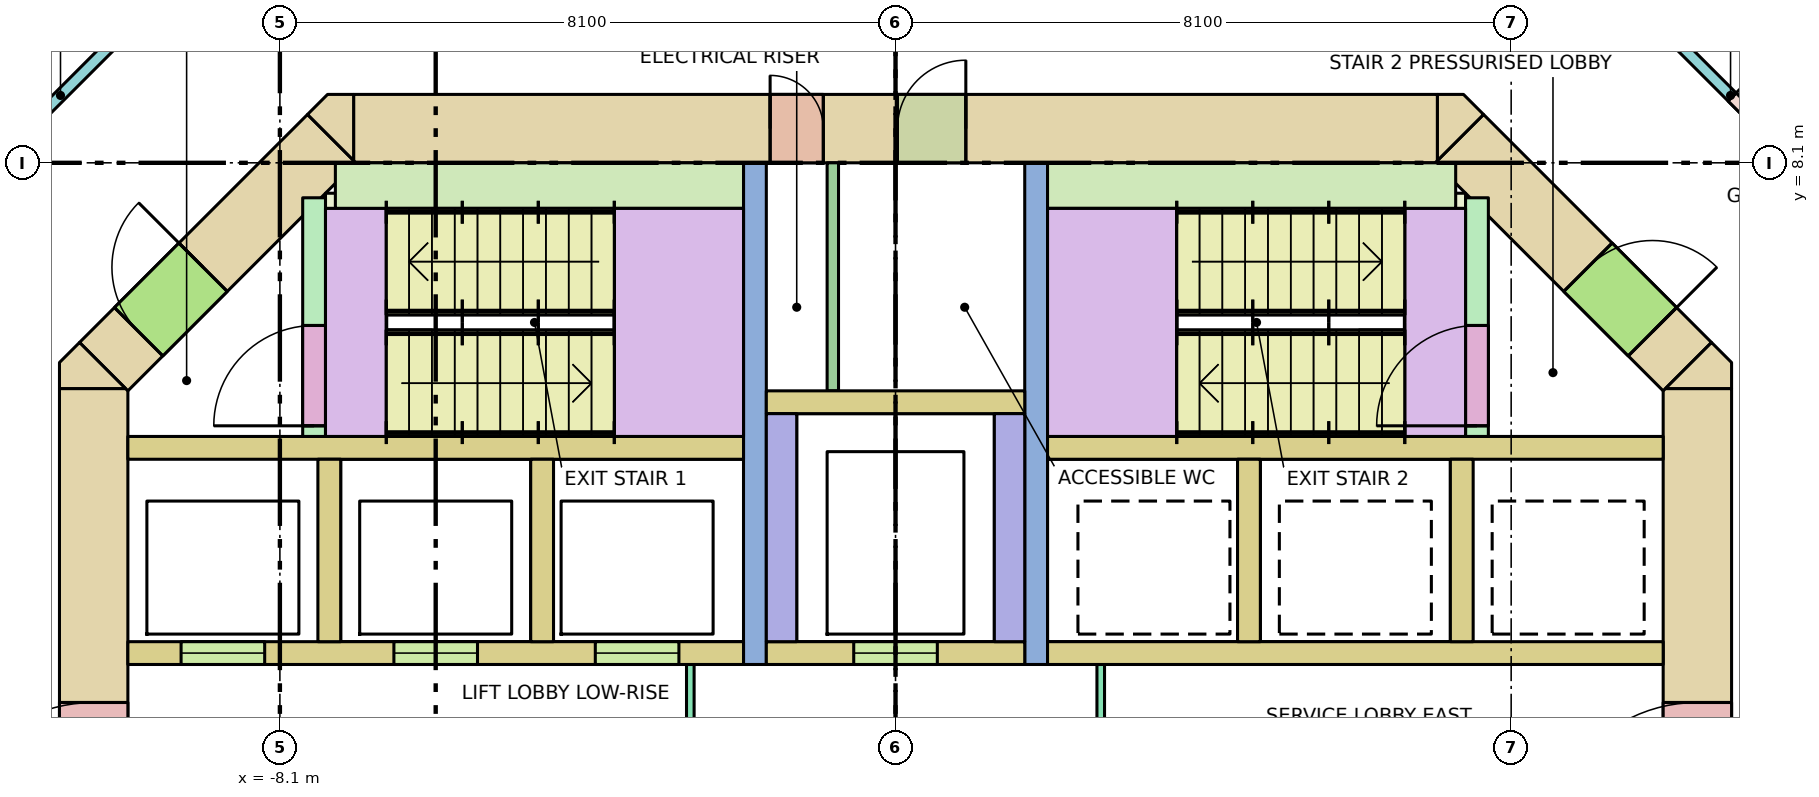
"""IFC4 building model, lengths in metres.
Left out: names, types, materials, properties, quantities, classifications, styles, units other than length and angle.
Written with IfcOpenShell. Run it as: python <this file> out.ifc"""

import sys

from ifc_helpers import new_model, si_unit, direction, frame, frame_2d, origin, place, context, subcontext, project, spatial, polyline, rectangle, outline, extrude, element, fill, save


model = new_model("IFC4")
c1 = context("Model", 3, precision=1e-05, world=origin(), true_north=direction((0.0, 1.0)))
c2 = subcontext(c1, "Body", "Model", "MODEL_VIEW")
j1 = project(units=[si_unit("LENGTHUNIT", "METRE"), si_unit("PLANEANGLEUNIT", "RADIAN")], contexts=[c1])
p1 = place(None, origin())
s1 = spatial("IfcSite", under=j1, at=p1, CompositionType="ELEMENT")
p2 = place(p1, origin())
s2 = spatial("IfcBuilding", under=s1, at=p2, CompositionType="ELEMENT")
p3 = place(p2, frame((0.0, 0.0, 79.0)))
s3 = spatial("IfcBuildingStorey", under=s2, at=p3, CompositionType="ELEMENT", Elevation=79.0)
p4 = place(p3, frame((-7.13, 8.55, -0.28), z_axis=(0.0, 0.0, 1.0), x_axis=(1.0, 0.0, 0.0)))
e1 = element("IfcWall", 1, at=p4, inside=s3, PredefinedType="SHEAR", context=c2, shape_type="SweptSolid", body=[
    extrude(rectangle(XDim=14.26, YDim=0.9, at=frame_2d((7.13, 0.0))), origin(), (0.0, 0.0, 1.0), 7.6),
])
p5 = place(p4, frame((5.48, 0.0, 0.28)))
e2 = element("IfcOpeningElement", 2, at=p5, cuts=e1, PredefinedType="OPENING", context=c2, shape_type="SweptSolid", body=[
    extrude(rectangle(XDim=0.7, YDim=2.1, at=frame_2d((0.35, 1.05))), frame((0.0, 0.46, 0.0), z_axis=(0.0, -1.0, 0.0), x_axis=(1.0, 0.0, 0.0)), (0.0, 0.0, 1.0), 0.92),
])
p6 = place(p4, frame((7.155, 0.0, 0.28)))
e3 = element("IfcOpeningElement", 3, at=p6, cuts=e1, PredefinedType="OPENING", context=c2, shape_type="SweptSolid", body=[
    extrude(rectangle(XDim=0.9, YDim=2.1, at=frame_2d((0.45, 1.05))), frame((0.0, 0.46, 0.0), z_axis=(0.0, -1.0, 0.0), x_axis=(1.0, 0.0, 0.0)), (0.0, 0.0, 1.0), 0.92),
])
p7 = place(p3, frame((-10.55, -5.13, -0.28), z_axis=(0.0, 0.0, 1.0), x_axis=(0.0, 1.0, 0.0)))
e4 = element("IfcWall", 4, at=p7, inside=s3, PredefinedType="SHEAR", context=c2, shape_type="SweptSolid", body=[
    extrude(rectangle(XDim=10.26, YDim=0.9, at=frame_2d((5.13, 0.0))), origin(), (0.0, 0.0, 1.0), 7.6),
])
p8 = place(p7, frame((4.13, 0.0, 0.28)))
e5 = element("IfcOpeningElement", 5, at=p8, cuts=e4, PredefinedType="OPENING", context=c2, shape_type="SweptSolid", body=[
    extrude(rectangle(XDim=2.0, YDim=2.1, at=frame_2d((1.0, 1.05))), frame((0.0, 0.46, 0.0), z_axis=(0.0, -1.0, 0.0), x_axis=(1.0, 0.0, 0.0)), (0.0, 0.0, 1.0), 0.92),
])
p9 = place(p3, frame((10.55, -5.13, -0.28), z_axis=(0.0, 0.0, 1.0), x_axis=(0.0, 1.0, 0.0)))
e6 = element("IfcWall", 6, at=p9, inside=s3, PredefinedType="SHEAR", context=c2, shape_type="SweptSolid", body=[
    extrude(rectangle(XDim=10.26, YDim=0.9, at=frame_2d((5.13, 0.0))), origin(), (0.0, 0.0, 1.0), 7.6),
])
p10 = place(p9, frame((4.13, 0.0, 0.28)))
e7 = element("IfcOpeningElement", 7, at=p10, cuts=e6, PredefinedType="OPENING", context=c2, shape_type="SweptSolid", body=[
    extrude(rectangle(XDim=2.0, YDim=2.1, at=frame_2d((1.0, 1.05))), frame((0.0, 0.46, 0.0), z_axis=(0.0, -1.0, 0.0), x_axis=(1.0, 0.0, 0.0)), (0.0, 0.0, 1.0), 0.92),
])
p11 = place(p3, frame((-10.418, 5.418, -0.28), z_axis=(0.0, 0.0, 1.0), x_axis=(0.707106781187, 0.707106781187, 0.0)))
e8 = element("IfcWall", 8, at=p11, inside=s3, PredefinedType="SHEAR", context=c2, shape_type="SweptSolid", body=[
    extrude(rectangle(XDim=4.243, YDim=0.9, at=frame_2d((2.121, 0.0))), origin(), (0.0, 0.0, 1.0), 7.6),
])
p12 = place(p11, frame((0.65, 0.0, 0.28)))
e9 = element("IfcOpeningElement", 9, at=p12, cuts=e8, PredefinedType="OPENING", context=c2, shape_type="SweptSolid", body=[
    extrude(rectangle(XDim=1.2, YDim=2.1, at=frame_2d((0.6, 1.05))), frame((0.0, 0.46, 0.0), z_axis=(0.0, -1.0, 0.0), x_axis=(1.0, 0.0, 0.0)), (0.0, 0.0, 1.0), 0.92),
])
p13 = place(p3, frame((7.418, 8.418, -0.28), z_axis=(0.0, 0.0, 1.0), x_axis=(0.707106781187, -0.707106781187, 0.0)))
e10 = element("IfcWall", 10, at=p13, inside=s3, PredefinedType="SHEAR", context=c2, shape_type="SweptSolid", body=[
    extrude(rectangle(XDim=4.243, YDim=0.9, at=frame_2d((2.121, 0.0))), origin(), (0.0, 0.0, 1.0), 7.6),
])
p14 = place(p13, frame((2.393, 0.0, 0.28)))
e11 = element("IfcOpeningElement", 11, at=p14, cuts=e10, PredefinedType="OPENING", context=c2, shape_type="SweptSolid", body=[
    extrude(rectangle(XDim=1.2, YDim=2.1, at=frame_2d((0.6, 1.05))), frame((0.0, 0.46, 0.0), z_axis=(0.0, -1.0, 0.0), x_axis=(1.0, 0.0, 0.0)), (0.0, 0.0, 1.0), 0.92),
])
p15 = place(p3, frame((0.0, 0.0, -0.28)))
e12 = element("IfcWall", 12, at=p15, inside=s3, PredefinedType="SHEAR", context=c2, shape_type="SweptSolid", body=[
    extrude(outline(polyline([(-10.736, 5.736), (-10.13, 5.13), (-11.0, 5.13), (-11.0, 5.473), (-10.736, 5.736)])), origin(), (0.0, 0.0, 1.0), 7.6),
])
p16 = place(p3, frame((0.0, 0.0, -0.28)))
e13 = element("IfcWall", 13, at=p16, inside=s3, PredefinedType="SHEAR", context=c2, shape_type="SweptSolid", body=[
    extrude(outline(polyline([(11.0, 5.473), (11.0, 5.13), (10.13, 5.13), (10.736, 5.736), (11.0, 5.473)])), origin(), (0.0, 0.0, 1.0), 7.6),
])
p17 = place(p3, frame((0.0, 0.0, -0.28)))
e14 = element("IfcWall", 14, at=p17, inside=s3, PredefinedType="SHEAR", context=c2, shape_type="SweptSolid", body=[
    extrude(outline(polyline([(-7.473, 9.0), (-7.13, 9.0), (-7.13, 8.13), (-7.736, 8.736), (-7.473, 9.0)])), origin(), (0.0, 0.0, 1.0), 7.6),
])
p18 = place(p3, frame((0.0, 0.0, -0.28)))
e15 = element("IfcWall", 15, at=p18, inside=s3, PredefinedType="SHEAR", context=c2, shape_type="SweptSolid", body=[
    extrude(outline(polyline([(7.473, 9.0), (7.736, 8.736), (7.13, 8.13), (7.13, 9.0), (7.473, 9.0)])), origin(), (0.0, 0.0, 1.0), 7.6),
])
for number, where, z_axis, x_axis in (
    (16, (-10.1, 4.35, 0.0), (0.0, 0.0, 1.0), (1.0, 0.0, 0.0)),
    (17, (2.0, 4.35, 0.0), (0.0, 0.0, 1.0), (1.0, 0.0, 0.0)),
):
    element("IfcWall", number, at=place(p3, frame(where, z_axis=z_axis, x_axis=x_axis)), inside=s3, PredefinedType="SOLIDWALL", context=c2, shape_type="SweptSolid", body=[
        extrude(rectangle(XDim=8.1, YDim=0.3, at=frame_2d((4.05, 0.0))), origin(), (0.0, 0.0, 1.0), 7.32),
    ])
p19 = place(p3, frame((-10.1, 1.65, 0.0), z_axis=(0.0, 0.0, 1.0), x_axis=(1.0, 0.0, 0.0)))
e18 = element("IfcWall", 18, at=p19, inside=s3, PredefinedType="SOLIDWALL", context=c2, shape_type="SweptSolid", body=[
    extrude(rectangle(XDim=8.1, YDim=0.3, at=frame_2d((4.05, 0.0))), origin(), (0.0, 0.0, 1.0), 7.32),
])
p20 = place(p19, frame((0.7, 0.0, 0.0)))
e19 = element("IfcOpeningElement", 19, at=p20, cuts=e18, PredefinedType="OPENING", context=c2, shape_type="SweptSolid", body=[
    extrude(rectangle(XDim=1.1, YDim=2.1, at=frame_2d((0.55, 1.05))), frame((0.0, 0.16, 0.0), z_axis=(0.0, -1.0, 0.0), x_axis=(1.0, 0.0, 0.0)), (0.0, 0.0, 1.0), 0.32),
])
p21 = place(p19, frame((3.5, 0.0, 0.0)))
e20 = element("IfcOpeningElement", 20, at=p21, cuts=e18, PredefinedType="OPENING", context=c2, shape_type="SweptSolid", body=[
    extrude(rectangle(XDim=1.1, YDim=2.1, at=frame_2d((0.55, 1.05))), frame((0.0, 0.16, 0.0), z_axis=(0.0, -1.0, 0.0), x_axis=(1.0, 0.0, 0.0)), (0.0, 0.0, 1.0), 0.32),
])
p22 = place(p19, frame((6.15, 0.0, 0.0)))
e21 = element("IfcOpeningElement", 21, at=p22, cuts=e18, PredefinedType="OPENING", context=c2, shape_type="SweptSolid", body=[
    extrude(rectangle(XDim=1.1, YDim=2.1, at=frame_2d((0.55, 1.05))), frame((0.0, 0.16, 0.0), z_axis=(0.0, -1.0, 0.0), x_axis=(1.0, 0.0, 0.0)), (0.0, 0.0, 1.0), 0.32),
])
p23 = place(p3, frame((2.0, 1.65, 0.0), z_axis=(0.0, 0.0, 1.0), x_axis=(1.0, 0.0, 0.0)))
e22 = element("IfcWall", 22, at=p23, inside=s3, PredefinedType="SOLIDWALL", context=c2, shape_type="SweptSolid", body=[
    extrude(rectangle(XDim=8.1, YDim=0.3, at=frame_2d((4.05, 0.0))), origin(), (0.0, 0.0, 1.0), 7.32),
])
for number, where, z_axis, x_axis in (
    (23, (-7.45, 1.8, 0.0), (0.0, 0.0, 1.0), (0.0, 1.0, 0.0)),
    (24, (-4.65, 1.8, 0.0), (0.0, 0.0, 1.0), (0.0, 1.0, 0.0)),
    (25, (4.65, 1.8, 0.0), (0.0, 0.0, 1.0), (0.0, 1.0, 0.0)),
    (26, (7.45, 1.8, 0.0), (0.0, 0.0, 1.0), (0.0, 1.0, 0.0)),
):
    element("IfcWall", number, at=place(p3, frame(where, z_axis=z_axis, x_axis=x_axis)), inside=s3, PredefinedType="SOLIDWALL", context=c2, shape_type="SweptSolid", body=[
        extrude(rectangle(XDim=2.4, YDim=0.3, at=frame_2d((1.2, 0.0))), origin(), (0.0, 0.0, 1.0), 7.32),
    ])
for number, where, z_axis, x_axis in (
    (27, (-1.85, 1.5, 0.0), (0.0, 0.0, 1.0), (0.0, 1.0, 0.0)),
    (28, (1.85, 1.5, 0.0), (0.0, 0.0, 1.0), (0.0, 1.0, 0.0)),
):
    element("IfcWall", number, at=place(p3, frame(where, z_axis=z_axis, x_axis=x_axis)), inside=s3, PredefinedType="SHEAR", context=c2, shape_type="SweptSolid", body=[
        extrude(rectangle(XDim=6.6, YDim=0.3, at=frame_2d((3.3, 0.0))), origin(), (0.0, 0.0, 1.0), 7.32),
    ])
p24 = place(p3, frame((-1.7, 1.65, 0.0), z_axis=(0.0, 0.0, 1.0), x_axis=(1.0, 0.0, 0.0)))
e29 = element("IfcWall", 29, at=p24, inside=s3, PredefinedType="SOLIDWALL", context=c2, shape_type="SweptSolid", body=[
    extrude(rectangle(XDim=3.4, YDim=0.3, at=frame_2d((1.7, 0.0))), origin(), (0.0, 0.0, 1.0), 7.32),
])
p25 = place(p24, frame((1.15, 0.0, 0.0)))
e30 = element("IfcOpeningElement", 30, at=p25, cuts=e29, PredefinedType="OPENING", context=c2, shape_type="SweptSolid", body=[
    extrude(rectangle(XDim=1.1, YDim=2.1, at=frame_2d((0.55, 1.05))), frame((0.0, 0.16, 0.0), z_axis=(0.0, -1.0, 0.0), x_axis=(1.0, 0.0, 0.0)), (0.0, 0.0, 1.0), 0.32),
])
for number, where, z_axis, x_axis in (
    (31, (-1.5, 1.8, 0.0), (0.0, 0.0, 1.0), (0.0, 1.0, 0.0)),
    (32, (1.5, 1.8, 0.0), (0.0, 0.0, 1.0), (0.0, 1.0, 0.0)),
):
    element("IfcWall", number, at=place(p3, frame(where, z_axis=z_axis, x_axis=x_axis)), inside=s3, PredefinedType="SOLIDWALL", context=c2, shape_type="SweptSolid", body=[
        extrude(rectangle(XDim=3.0, YDim=0.4, at=frame_2d((1.5, 0.0))), origin(), (0.0, 0.0, 1.0), 7.32),
    ])
p26 = place(p3, frame((-1.7, 4.95, 0.0), z_axis=(0.0, 0.0, 1.0), x_axis=(1.0, 0.0, 0.0)))
e33 = element("IfcWall", 33, at=p26, inside=s3, PredefinedType="SOLIDWALL", context=c2, shape_type="SweptSolid", body=[
    extrude(rectangle(XDim=3.4, YDim=0.3, at=frame_2d((1.7, 0.0))), origin(), (0.0, 0.0, 1.0), 7.32),
])
p27 = place(p3, frame((-7.65, 4.5, 0.0), z_axis=(0.0, 0.0, 1.0), x_axis=(0.0, 1.0, 0.0)))
e34 = element("IfcWall", 34, at=p27, inside=s3, PredefinedType="SHEAR", context=c2, shape_type="SweptSolid", body=[
    extrude(rectangle(XDim=3.14, YDim=0.3, at=frame_2d((1.57, 0.0))), origin(), (0.0, 0.0, 1.0), 7.32),
])
p28 = place(p27, frame((0.14, 0.0, 0.0)))
e35 = element("IfcOpeningElement", 35, at=p28, cuts=e34, PredefinedType="OPENING", context=c2, shape_type="SweptSolid", body=[
    extrude(rectangle(XDim=1.32, YDim=2.1, at=frame_2d((0.66, 1.05))), frame((0.0, 0.16, 0.0), z_axis=(0.0, -1.0, 0.0), x_axis=(1.0, 0.0, 0.0)), (0.0, 0.0, 1.0), 0.32),
])
p29 = place(p3, frame((-7.37, 7.8, 0.0), z_axis=(0.0, 0.0, 1.0), x_axis=(1.0, 0.0, 0.0)))
e36 = element("IfcWall", 36, at=p29, inside=s3, PredefinedType="SHEAR", context=c2, shape_type="SweptSolid", body=[
    extrude(rectangle(XDim=5.37, YDim=0.6, at=frame_2d((2.685, 0.0))), origin(), (0.0, 0.0, 1.0), 7.32),
])
p30 = place(p3, frame((7.65, 4.5, 0.0), z_axis=(0.0, 0.0, 1.0), x_axis=(0.0, 1.0, 0.0)))
e37 = element("IfcWall", 37, at=p30, inside=s3, PredefinedType="SHEAR", context=c2, shape_type="SweptSolid", body=[
    extrude(rectangle(XDim=3.14, YDim=0.3, at=frame_2d((1.57, 0.0))), origin(), (0.0, 0.0, 1.0), 7.32),
])
p31 = place(p30, frame((0.14, 0.0, 0.0)))
e38 = element("IfcOpeningElement", 38, at=p31, cuts=e37, PredefinedType="OPENING", context=c2, shape_type="SweptSolid", body=[
    extrude(rectangle(XDim=1.32, YDim=2.1, at=frame_2d((0.66, 1.05))), frame((0.0, 0.16, 0.0), z_axis=(0.0, -1.0, 0.0), x_axis=(1.0, 0.0, 0.0)), (0.0, 0.0, 1.0), 0.32),
])
p32 = place(p3, frame((2.0, 7.8, 0.0), z_axis=(0.0, 0.0, 1.0), x_axis=(1.0, 0.0, 0.0)))
e39 = element("IfcWall", 39, at=p32, inside=s3, PredefinedType="SHEAR", context=c2, shape_type="SweptSolid", body=[
    extrude(rectangle(XDim=5.37, YDim=0.6, at=frame_2d((2.685, 0.0))), origin(), (0.0, 0.0, 1.0), 7.32),
])
for number, where, z_axis, x_axis in (
    (40, (-7.5, 7.6, 0.0), (0.0, 0.0, 1.0), (1.0, 0.0, 0.0)),
    (41, (6.9, 7.6, 0.0), (0.0, 0.0, 1.0), (1.0, 0.0, 0.0)),
):
    element("IfcWall", number, at=place(p3, frame(where, z_axis=z_axis, x_axis=x_axis)), inside=s3, PredefinedType="SHEAR", context=c2, shape_type="SweptSolid", body=[
        extrude(rectangle(XDim=0.6, YDim=0.2, at=frame_2d((0.3, 0.0))), origin(), (0.0, 0.0, 1.0), 7.32),
    ])
p33 = place(p3, frame((-2.7, -1.5, 0.0), z_axis=(0.0, 0.0, 1.0), x_axis=(0.0, 1.0, 0.0)))
e42 = element("IfcWall", 42, at=p33, inside=s3, PredefinedType="PARTITIONING", context=c2, shape_type="SweptSolid", body=[
    extrude(rectangle(XDim=3.0, YDim=0.1, at=frame_2d((1.5, 0.0))), origin(), (0.0, 0.0, 1.0), 7.32),
])
p34 = place(p33, frame((0.9, 0.0, 0.0)))
e43 = element("IfcOpeningElement", 43, at=p34, cuts=e42, PredefinedType="OPENING", context=c2, shape_type="SweptSolid", body=[
    extrude(rectangle(XDim=1.2, YDim=2.1, at=frame_2d((0.6, 1.05))), frame((0.0, 0.06, 0.0), z_axis=(0.0, -1.0, 0.0), x_axis=(1.0, 0.0, 0.0)), (0.0, 0.0, 1.0), 0.12),
])
p35 = place(p3, frame((2.7, -1.5, 0.0), z_axis=(0.0, 0.0, 1.0), x_axis=(0.0, 1.0, 0.0)))
e44 = element("IfcWall", 44, at=p35, inside=s3, PredefinedType="PARTITIONING", context=c2, shape_type="SweptSolid", body=[
    extrude(rectangle(XDim=3.0, YDim=0.1, at=frame_2d((1.5, 0.0))), origin(), (0.0, 0.0, 1.0), 7.32),
])
p36 = place(p35, frame((0.9, 0.0, 0.0)))
e45 = element("IfcOpeningElement", 45, at=p36, cuts=e44, PredefinedType="OPENING", context=c2, shape_type="SweptSolid", body=[
    extrude(rectangle(XDim=1.2, YDim=2.1, at=frame_2d((0.6, 1.05))), frame((0.0, 0.06, 0.0), z_axis=(0.0, -1.0, 0.0), x_axis=(1.0, 0.0, 0.0)), (0.0, 0.0, 1.0), 0.12),
])
p37 = place(p3, frame((-0.825, 5.1, 0.0), z_axis=(0.0, 0.0, 1.0), x_axis=(0.0, 1.0, 0.0)))
e46 = element("IfcWall", 46, at=p37, inside=s3, PredefinedType="PARTITIONING", context=c2, shape_type="SweptSolid", body=[
    extrude(rectangle(XDim=3.0, YDim=0.15, at=frame_2d((1.5, 0.0))), origin(), (0.0, 0.0, 1.0), 7.32),
])
p38 = place(p3, frame((-13.438, 6.535, 0.0), z_axis=(0.0, 0.0, 1.0), x_axis=(0.707106781187, 0.707106781187, 0.0)))
e47 = element("IfcWall", 47, at=p38, inside=s3, PredefinedType="PARTITIONING", context=c2, shape_type="SweptSolid", body=[
    extrude(rectangle(XDim=6.934, YDim=0.15, at=frame_2d((3.467, 0.0))), origin(), (0.0, 0.0, 1.0), 6.42),
])
p39 = place(p3, frame((8.535, 11.438, 0.0), z_axis=(0.0, 0.0, 1.0), x_axis=(0.707106781187, -0.707106781187, 0.0)))
e48 = element("IfcWall", 48, at=p39, inside=s3, PredefinedType="PARTITIONING", context=c2, shape_type="SweptSolid", body=[
    extrude(rectangle(XDim=6.934, YDim=0.15, at=frame_2d((3.467, 0.0))), origin(), (0.0, 0.0, 1.0), 6.42),
])
p40 = place(p39, frame((3.496, 0.0, 0.0)))
e49 = element("IfcOpeningElement", 49, at=p40, cuts=e48, PredefinedType="OPENING", context=c2, shape_type="SweptSolid", body=[
    extrude(rectangle(XDim=0.9, YDim=2.1, at=frame_2d((0.45, 1.05))), frame((0.0, 0.085, 0.0), z_axis=(0.0, -1.0, 0.0), x_axis=(1.0, 0.0, 0.0)), (0.0, 0.0, 1.0), 0.17),
])
p41 = place(p20, origin())
e50 = element("IfcDoor", 50, at=p41, inside=s3, OperationType="DOUBLE_DOOR_SLIDING", PredefinedType="DOOR", context=c2, shape_type="SweptSolid", body=[
    extrude(rectangle(XDim=1.1, YDim=2.1, at=frame_2d((0.55, 1.05))), frame((0.0, 0.025, 0.0), z_axis=(0.0, -1.0, 0.0), x_axis=(1.0, 0.0, 0.0)), (0.0, 0.0, 1.0), 0.05),
])
fill(e19, e50)
p42 = place(p21, origin())
e51 = element("IfcDoor", 51, at=p42, inside=s3, OperationType="DOUBLE_DOOR_SLIDING", PredefinedType="DOOR", context=c2, shape_type="SweptSolid", body=[
    extrude(rectangle(XDim=1.1, YDim=2.1, at=frame_2d((0.55, 1.05))), frame((0.0, 0.025, 0.0), z_axis=(0.0, -1.0, 0.0), x_axis=(1.0, 0.0, 0.0)), (0.0, 0.0, 1.0), 0.05),
])
fill(e20, e51)
p43 = place(p22, origin())
e52 = element("IfcDoor", 52, at=p43, inside=s3, OperationType="DOUBLE_DOOR_SLIDING", PredefinedType="DOOR", context=c2, shape_type="SweptSolid", body=[
    extrude(rectangle(XDim=1.1, YDim=2.1, at=frame_2d((0.55, 1.05))), frame((0.0, 0.025, 0.0), z_axis=(0.0, -1.0, 0.0), x_axis=(1.0, 0.0, 0.0)), (0.0, 0.0, 1.0), 0.05),
])
fill(e21, e52)
p44 = place(p25, origin())
e53 = element("IfcDoor", 53, at=p44, inside=s3, OperationType="DOUBLE_DOOR_SLIDING", PredefinedType="DOOR", context=c2, shape_type="SweptSolid", body=[
    extrude(rectangle(XDim=1.1, YDim=2.1, at=frame_2d((0.55, 1.05))), frame((0.0, 0.025, 0.0), z_axis=(0.0, -1.0, 0.0), x_axis=(1.0, 0.0, 0.0)), (0.0, 0.0, 1.0), 0.05),
])
fill(e30, e53)
p45 = place(p28, origin())
e54 = element("IfcDoor", 54, at=p45, inside=s3, OperationType="DOUBLE_DOOR_SINGLE_SWING", PredefinedType="DOOR", context=c2, shape_type="SweptSolid", body=[
    extrude(rectangle(XDim=1.32, YDim=2.1, at=frame_2d((0.66, 1.05))), frame((0.0, 0.025, 0.0), z_axis=(0.0, -1.0, 0.0), x_axis=(1.0, 0.0, 0.0)), (0.0, 0.0, 1.0), 0.05),
])
fill(e35, e54)
p46 = place(p12, origin())
e55 = element("IfcDoor", 55, at=p46, inside=s3, OperationType="SINGLE_SWING_RIGHT", PredefinedType="DOOR", context=c2, shape_type="SweptSolid", body=[
    extrude(rectangle(XDim=1.2, YDim=2.1, at=frame_2d((0.6, 1.05))), frame((0.0, 0.025, 0.0), z_axis=(0.0, -1.0, 0.0), x_axis=(1.0, 0.0, 0.0)), (0.0, 0.0, 1.0), 0.05),
])
fill(e9, e55)
p47 = place(p31, origin())
e56 = element("IfcDoor", 56, at=p47, inside=s3, OperationType="DOUBLE_DOOR_SINGLE_SWING", PredefinedType="DOOR", context=c2, shape_type="SweptSolid", body=[
    extrude(rectangle(XDim=1.32, YDim=2.1, at=frame_2d((0.66, 1.05))), frame((0.0, 0.025, 0.0), z_axis=(0.0, -1.0, 0.0), x_axis=(1.0, 0.0, 0.0)), (0.0, 0.0, 1.0), 0.05),
])
fill(e38, e56)
p48 = place(p14, origin())
e57 = element("IfcDoor", 57, at=p48, inside=s3, OperationType="SINGLE_SWING_RIGHT", PredefinedType="DOOR", context=c2, shape_type="SweptSolid", body=[
    extrude(rectangle(XDim=1.2, YDim=2.1, at=frame_2d((0.6, 1.05))), frame((0.0, 0.025, 0.0), z_axis=(0.0, -1.0, 0.0), x_axis=(1.0, 0.0, 0.0)), (0.0, 0.0, 1.0), 0.05),
])
fill(e11, e57)
p49 = place(p8, origin())
e58 = element("IfcDoor", 58, at=p49, inside=s3, OperationType="DOUBLE_DOOR_SINGLE_SWING", PredefinedType="DOOR", context=c2, shape_type="SweptSolid", body=[
    extrude(rectangle(XDim=2.0, YDim=2.1, at=frame_2d((1.0, 1.05))), frame((0.0, 0.025, 0.0), z_axis=(0.0, -1.0, 0.0), x_axis=(1.0, 0.0, 0.0)), (0.0, 0.0, 1.0), 0.05),
])
fill(e5, e58)
p50 = place(p10, origin())
e59 = element("IfcDoor", 59, at=p50, inside=s3, OperationType="DOUBLE_DOOR_SINGLE_SWING", PredefinedType="DOOR", context=c2, shape_type="SweptSolid", body=[
    extrude(rectangle(XDim=2.0, YDim=2.1, at=frame_2d((1.0, 1.05))), frame((0.0, 0.025, 0.0), z_axis=(0.0, -1.0, 0.0), x_axis=(1.0, 0.0, 0.0)), (0.0, 0.0, 1.0), 0.05),
])
fill(e7, e59)
p51 = place(p5, origin())
e60 = element("IfcDoor", 60, at=p51, inside=s3, OperationType="SINGLE_SWING_LEFT", PredefinedType="DOOR", context=c2, shape_type="SweptSolid", body=[
    extrude(rectangle(XDim=0.7, YDim=2.1, at=frame_2d((0.35, 1.05))), frame((0.0, 0.025, 0.0), z_axis=(0.0, -1.0, 0.0), x_axis=(1.0, 0.0, 0.0)), (0.0, 0.0, 1.0), 0.05),
])
fill(e2, e60)
p52 = place(p6, origin())
e61 = element("IfcDoor", 61, at=p52, inside=s3, OperationType="SINGLE_SWING_RIGHT", PredefinedType="DOOR", context=c2, shape_type="SweptSolid", body=[
    extrude(rectangle(XDim=0.9, YDim=2.1, at=frame_2d((0.45, 1.05))), frame((0.0, 0.025, 0.0), z_axis=(0.0, -1.0, 0.0), x_axis=(1.0, 0.0, 0.0)), (0.0, 0.0, 1.0), 0.05),
])
fill(e3, e61)
p53 = place(p40, origin())
e62 = element("IfcDoor", 62, at=p53, inside=s3, OperationType="SINGLE_SWING_LEFT", PredefinedType="DOOR", context=c2, shape_type="SweptSolid", body=[
    extrude(rectangle(XDim=0.9, YDim=2.1, at=frame_2d((0.45, 1.05))), frame((0.0, 0.025, 0.0), z_axis=(0.0, -1.0, 0.0), x_axis=(1.0, 0.0, 0.0)), (0.0, 0.0, 1.0), 0.05),
])
fill(e49, e62)
save(model, sys.argv[1])
